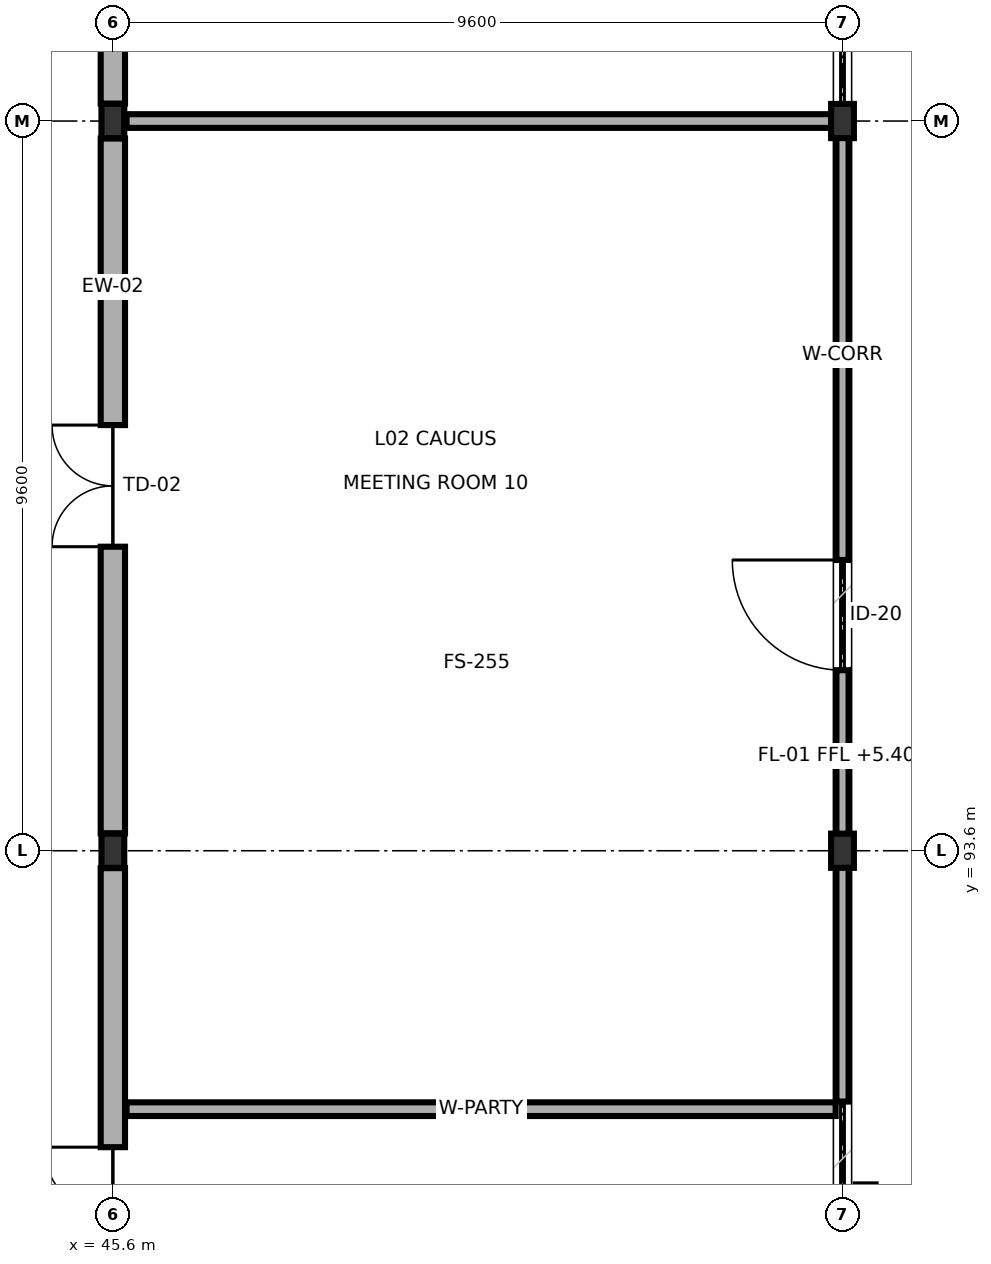
"""IFC4 building model, lengths in metres.
Left out: names, types, materials, properties, quantities, classifications, styles, units other than length and angle.
Written with IfcOpenShell. Run it as: python <this file> out.ifc"""

import sys

from ifc_helpers import new_model, si_unit, direction, frame, frame_2d, origin, origin_2d, place, context, subcontext, project, spatial, rectangle, i_section, extrude, element, fill, save


model = new_model("IFC4")
c1 = context("Model", 3, precision=1e-05, world=origin(), true_north=direction((0.0, 1.0)))
c2 = subcontext(c1, "Body", "Model", "MODEL_VIEW")
j1 = project(units=[si_unit("LENGTHUNIT", "METRE"), si_unit("PLANEANGLEUNIT", "RADIAN")], contexts=[c1])
p1 = place(None, origin())
s1 = spatial("IfcSite", under=j1, at=p1, CompositionType="ELEMENT")
p2 = place(p1, origin())
s2 = spatial("IfcBuilding", under=s1, at=p2, CompositionType="ELEMENT")
p3 = place(p2, frame((0.0, 0.0, 5.4)))
s3 = spatial("IfcBuildingStorey", under=s2, at=p3, CompositionType="ELEMENT", Elevation=5.4)
for number, where, z_axis, x_axis in (
    (1, (45.6, 93.6, 0.0), (0.0, 0.0, 1.0), (1.0, 0.0, 0.0)),
    (2, (45.6, 103.2, 0.0), (0.0, 0.0, 1.0), (1.0, 0.0, 0.0)),
    (3, (55.2, 93.6, 0.0), (0.0, 0.0, 1.0), (1.0, 0.0, 0.0)),
    (4, (55.2, 103.2, 0.0), (0.0, 0.0, 1.0), (1.0, 0.0, 0.0)),
):
    element("IfcColumn", number, at=place(p3, frame(where, z_axis=z_axis, x_axis=x_axis)), inside=s3, PredefinedType="COLUMN", context=c2, shape_type="SweptSolid", body=[
        extrude(i_section(OverallWidth=0.3, OverallDepth=0.45, WebThickness=0.014, FlangeThickness=0.026, FilletRadius=0.027, at=origin_2d()), origin(), (0.0, 0.0, 1.0), 4.5),
    ])
p4 = place(p3, frame((45.6, 84.229, 0.0), z_axis=(0.0, 0.0, 1.0), x_axis=(0.0, 1.0, 0.0)))
e5 = element("IfcWall", 5, at=p4, inside=s3, PredefinedType="SOLIDWALL", context=c2, shape_type="SweptSolid", body=[
    extrude(rectangle(XDim=9.142, YDim=0.32, at=frame_2d((4.571, 0.0))), origin(), (0.0, 0.0, 1.0), 3.675),
])
p5 = place(p4, frame((3.671, 0.0, 0.0)))
e6 = element("IfcOpeningElement", 6, at=p5, cuts=e5, PredefinedType="OPENING", context=c2, shape_type="SweptSolid", body=[
    extrude(rectangle(XDim=1.8, YDim=2.2, at=frame_2d((0.9, 1.1))), frame((0.0, 0.17, 0.0), z_axis=(0.0, -1.0, 0.0), x_axis=(1.0, 0.0, 0.0)), (0.0, 0.0, 1.0), 0.34),
])
p6 = place(p3, frame((45.6, 93.829, 0.0), z_axis=(0.0, 0.0, 1.0), x_axis=(0.0, 1.0, 0.0)))
e7 = element("IfcWall", 7, at=p6, inside=s3, PredefinedType="SOLIDWALL", context=c2, shape_type="SweptSolid", body=[
    extrude(rectangle(XDim=9.142, YDim=0.32, at=frame_2d((4.571, 0.0))), origin(), (0.0, 0.0, 1.0), 3.675),
])
p7 = place(p6, frame((3.771, 0.0, 0.0)))
e8 = element("IfcOpeningElement", 8, at=p7, cuts=e7, PredefinedType="OPENING", context=c2, shape_type="SweptSolid", body=[
    extrude(rectangle(XDim=1.6, YDim=2.2, at=frame_2d((0.8, 1.1))), frame((0.0, 0.17, 0.0), z_axis=(0.0, -1.0, 0.0), x_axis=(1.0, 0.0, 0.0)), (0.0, 0.0, 1.0), 0.34),
])
p8 = place(p3, frame((45.6, 103.429, 0.0), z_axis=(0.0, 0.0, 1.0), x_axis=(0.0, 1.0, 0.0)))
e9 = element("IfcWall", 9, at=p8, inside=s3, PredefinedType="SOLIDWALL", context=c2, shape_type="SweptSolid", body=[
    extrude(rectangle(XDim=9.142, YDim=0.32, at=frame_2d((4.571, 0.0))), origin(), (0.0, 0.0, 1.0), 3.675),
])
p9 = place(p8, frame((1.936, 0.0, 0.75)))
e10 = element("IfcOpeningElement", 10, at=p9, cuts=e9, PredefinedType="OPENING", context=c2, shape_type="SweptSolid", body=[
    extrude(rectangle(XDim=1.85, YDim=1.95, at=frame_2d((0.925, 0.975))), frame((0.0, 0.17, 0.0), z_axis=(0.0, -1.0, 0.0), x_axis=(1.0, 0.0, 0.0)), (0.0, 0.0, 1.0), 0.34),
])
p10 = place(p8, frame((5.356, 0.0, 0.75)))
e11 = element("IfcOpeningElement", 11, at=p10, cuts=e9, PredefinedType="OPENING", context=c2, shape_type="SweptSolid", body=[
    extrude(rectangle(XDim=1.85, YDim=1.95, at=frame_2d((0.925, 0.975))), frame((0.0, 0.17, 0.0), z_axis=(0.0, -1.0, 0.0), x_axis=(1.0, 0.0, 0.0)), (0.0, 0.0, 1.0), 0.34),
])
p11 = place(p3, frame((55.505, 84.94, 0.0), z_axis=(0.0, 0.0, 1.0), x_axis=(0.0, 1.0, 0.0)))
e12 = element("IfcWall", 12, at=p11, inside=s3, PredefinedType="SHEAR", context=c2, shape_type="SweptSolid", body=[
    extrude(rectangle(XDim=4.27, YDim=0.26, at=frame_2d((2.135, 0.0))), origin(), (0.0, 0.0, 1.0), 4.24),
])
p12 = place(p3, frame((55.2, 90.3, 0.0), z_axis=(0.0, 0.0, 1.0), x_axis=(0.0, 1.0, 0.0)))
e13 = element("IfcWall", 13, at=p12, inside=s3, PredefinedType="PARTITIONING", context=c2, shape_type="SweptSolid", body=[
    extrude(rectangle(XDim=12.8, YDim=0.16, at=frame_2d((6.4, 0.0))), origin(), (0.0, 0.0, 1.0), 3.685),
])
p13 = place(p12, frame((5.675, 0.0, 0.0)))
e14 = element("IfcOpeningElement", 14, at=p13, cuts=e13, PredefinedType="OPENING", context=c2, shape_type="SweptSolid", body=[
    extrude(rectangle(XDim=1.45, YDim=2.24, at=frame_2d((0.725, 1.12))), frame((0.0, 0.09, 0.0), z_axis=(0.0, -1.0, 0.0), x_axis=(1.0, 0.0, 0.0)), (0.0, 0.0, 1.0), 0.18),
])
p14 = place(p3, frame((45.78, 90.2, 0.0), z_axis=(0.0, 0.0, 1.0), x_axis=(1.0, 0.0, 0.0)))
e15 = element("IfcWall", 15, at=p14, inside=s3, PredefinedType="PARTITIONING", context=c2, shape_type="SweptSolid", body=[
    extrude(rectangle(XDim=9.33, YDim=0.18, at=frame_2d((4.665, 0.0))), origin(), (0.0, 0.0, 1.0), 3.675),
])
p15 = place(p3, frame((45.78, 103.2, 0.0), z_axis=(0.0, 0.0, 1.0), x_axis=(1.0, 0.0, 0.0)))
e16 = element("IfcWall", 16, at=p15, inside=s3, PredefinedType="PARTITIONING", context=c2, shape_type="SweptSolid", body=[
    extrude(rectangle(XDim=9.33, YDim=0.18, at=frame_2d((4.665, 0.0))), origin(), (0.0, 0.0, 1.0), 3.685),
])
p16 = place(p5, origin())
e17 = element("IfcDoor", 17, at=p16, inside=s3, OperationType="DOUBLE_DOOR_SINGLE_SWING", PredefinedType="DOOR", context=c2, shape_type="SweptSolid", body=[
    extrude(rectangle(XDim=1.8, YDim=2.2, at=frame_2d((0.9, 1.1))), frame((0.0, 0.025, 0.0), z_axis=(0.0, -1.0, 0.0), x_axis=(1.0, 0.0, 0.0)), (0.0, 0.0, 1.0), 0.05),
])
fill(e6, e17)
p17 = place(p7, origin())
e18 = element("IfcDoor", 18, at=p17, inside=s3, OperationType="DOUBLE_DOOR_SINGLE_SWING", PredefinedType="DOOR", context=c2, shape_type="SweptSolid", body=[
    extrude(rectangle(XDim=1.6, YDim=2.2, at=frame_2d((0.8, 1.1))), frame((0.0, 0.025, 0.0), z_axis=(0.0, -1.0, 0.0), x_axis=(1.0, 0.0, 0.0)), (0.0, 0.0, 1.0), 0.05),
])
fill(e8, e18)
p18 = place(p13, origin())
e19 = element("IfcDoor", 19, at=p18, inside=s3, OperationType="SINGLE_SWING_RIGHT", PredefinedType="DOOR", context=c2, shape_type="SweptSolid", body=[
    extrude(rectangle(XDim=1.45, YDim=2.24, at=frame_2d((0.725, 1.12))), frame((0.0, 0.025, 0.0), z_axis=(0.0, -1.0, 0.0), x_axis=(1.0, 0.0, 0.0)), (0.0, 0.0, 1.0), 0.05),
])
fill(e14, e19)
save(model, sys.argv[1])
